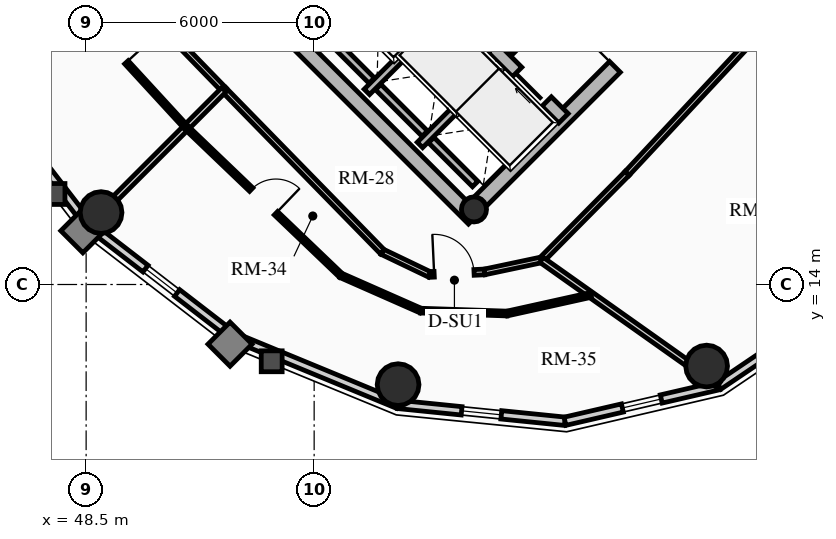
"""IFC4 building model, lengths in metres.
Left out: names, types, materials, properties, quantities, classifications, styles, units other than length and angle.
Written with IfcOpenShell. Run it as: python <this file> out.ifc"""

import sys

from ifc_helpers import new_model, si_unit, direction, frame, frame_2d, origin, origin_2d, place, context, subcontext, project, spatial, rectangle, circle, hollow_circle, extrude, source, transform, mapped, element, fill, save


model = new_model("IFC4")
c1 = context("Model", 3, precision=1e-05, world=origin(), true_north=direction((0.0, 1.0)))
c2 = subcontext(c1, "Body", "Model", "MODEL_VIEW")
j1 = project(units=[si_unit("LENGTHUNIT", "METRE"), si_unit("PLANEANGLEUNIT", "RADIAN")], contexts=[c1])
p1 = place(None, origin())
s1 = spatial("IfcSite", under=j1, at=p1, CompositionType="ELEMENT")
p2 = place(p1, origin())
s2 = spatial("IfcBuilding", under=s1, at=p2, CompositionType="ELEMENT")
p3 = place(p2, frame((0.0, 0.0, 226.05)))
s3 = spatial("IfcBuildingStorey", under=s2, at=p3, CompositionType="ELEMENT", Elevation=226.05)
p4 = place(p3, frame((58.702, 15.732, 0.0), z_axis=(0.0, 0.0, 1.0), x_axis=(-0.707106781187, 0.707106781187, 0.0)))
e1 = element("IfcWall", 1, at=p4, inside=s3, PredefinedType="SHEAR", context=c2, shape_type="SweptSolid", body=[
    extrude(rectangle(XDim=14.1, YDim=0.4, at=frame_2d((7.05, 0.0))), origin(), (0.0, 0.0, 1.0), 3.2),
])
p5 = place(p3, frame((58.561, 15.873, 0.0), z_axis=(0.0, 0.0, 1.0), x_axis=(0.707106781187, 0.707106781187, 0.0)))
e2 = element("IfcWall", 2, at=p5, inside=s3, PredefinedType="SHEAR", context=c2, shape_type="SweptSolid", body=[
    extrude(rectangle(XDim=10.7, YDim=0.4, at=frame_2d((5.35, 0.0))), origin(), (0.0, 0.0, 1.0), 3.2),
])
m1 = source(origin(), c2, "Body", "SweptSolid", [
    extrude(rectangle(XDim=1.5, YDim=2.02, at=frame_2d((0.75, 1.01))), frame((0.0, 0.21, 0.0), z_axis=(0.0, -1.0, 0.0), x_axis=(1.0, 0.0, 0.0)), (0.0, 0.0, 1.0), 0.42),
])
p6 = place(p5, frame((5.45, 0.0, 0.0)))
e3 = element("IfcOpeningElement", 3, at=p6, cuts=e2, PredefinedType="OPENING", context=c2, shape_type="MappedRepresentation", body=[
    mapped(m1, transform((0.0, 0.0, 0.0), x_axis=(1.0, 0.0, 0.0), y_axis=(0.0, 1.0, 0.0), z_axis=(0.0, 0.0, 1.0), scale=1.0)),
])
p7 = place(p3, frame((61.06, 18.373, 0.0), z_axis=(0.0, 0.0, 1.0), x_axis=(-0.707106781187, 0.707106781187, 0.0)))
e4 = element("IfcWall", 4, at=p7, inside=s3, PredefinedType="SHEAR", context=c2, shape_type="SweptSolid", body=[
    extrude(rectangle(XDim=13.7, YDim=0.35, at=frame_2d((6.85, 0.0))), origin(), (0.0, 0.0, 1.0), 3.2),
])
m2 = source(origin(), c2, "Body", "SweptSolid", [
    extrude(rectangle(XDim=1.1, YDim=2.015, at=frame_2d((0.55, 1.007))), frame((0.0, 0.185, 0.0), z_axis=(0.0, -1.0, 0.0), x_axis=(1.0, 0.0, 0.0)), (0.0, 0.0, 1.0), 0.37),
])
p8 = place(p7, frame((4.85, 0.0, 0.0)))
e5 = element("IfcOpeningElement", 5, at=p8, cuts=e4, PredefinedType="OPENING", context=c2, shape_type="MappedRepresentation", body=[
    mapped(m2, transform((0.0, 0.0, 0.0), x_axis=(1.0, 0.0, 0.0), y_axis=(0.0, 1.0, 0.0), z_axis=(0.0, 0.0, 1.0), scale=1.0)),
])
p9 = place(p7, frame((0.625, 0.0, 0.0)))
e6 = element("IfcOpeningElement", 6, at=p9, cuts=e4, PredefinedType="OPENING", context=c2, shape_type="MappedRepresentation", body=[
    mapped(m2, transform((0.0, 0.0, 0.0), x_axis=(1.0, 0.0, 0.0), y_axis=(0.0, 1.0, 0.0), z_axis=(0.0, 0.0, 1.0), scale=1.0)),
])
p10 = place(p7, frame((2.625, 0.0, 0.0)))
e7 = element("IfcOpeningElement", 7, at=p10, cuts=e4, PredefinedType="OPENING", context=c2, shape_type="MappedRepresentation", body=[
    mapped(m2, transform((0.0, 0.0, 0.0), x_axis=(1.0, 0.0, 0.0), y_axis=(0.0, 1.0, 0.0), z_axis=(0.0, 0.0, 1.0), scale=1.0)),
])
m3 = source(origin(), c2, "Body", "SweptSolid", [
    extrude(rectangle(XDim=1.15, YDim=2.02, at=frame_2d((0.575, 1.01))), frame((0.0, 0.185, 0.0), z_axis=(0.0, -1.0, 0.0), x_axis=(1.0, 0.0, 0.0)), (0.0, 0.0, 1.0), 0.37),
])
p11 = place(p7, frame((7.27, 0.0, 0.0)))
e8 = element("IfcOpeningElement", 8, at=p11, cuts=e4, PredefinedType="OPENING", context=c2, shape_type="MappedRepresentation", body=[
    mapped(m3, transform((0.0, 0.0, 0.0), x_axis=(1.0, 0.0, 0.0), y_axis=(0.0, 1.0, 0.0), z_axis=(0.0, 0.0, 1.0), scale=1.0)),
])
p12 = place(p3, frame((58.706, 15.976, 0.0), z_axis=(0.0, 0.0, 1.0), x_axis=(0.707106781187, 0.707106781187, 0.0)))
e9 = element("IfcColumn", 9, at=p12, inside=s3, PredefinedType="COLUMN", context=c2, shape_type="SweptSolid", body=[
    extrude(hollow_circle(Radius=0.33, WallThickness=0.025, at=origin_2d()), origin(), (0.0, 0.0, 1.0), 3.2),
])
for number, where, z_axis, x_axis in (
    (10, (48.893, 15.893, 0.0), (0.0, 0.0, 1.0), (1.0, 0.0, 0.0)),
    (11, (56.709, 11.365, 0.0), (0.0, 0.0, 1.0), (1.0, 0.0, 0.0)),
    (12, (64.827, 11.854, 0.0), (0.0, 0.0, 1.0), (1.0, 0.0, 0.0)),
):
    element("IfcColumn", number, at=place(p3, frame(where, z_axis=z_axis, x_axis=x_axis)), inside=s3, PredefinedType="USERDEFINED", context=c2, shape_type="SweptSolid", body=[
        extrude(circle(Radius=0.55, at=origin_2d()), origin(), (0.0, 0.0, 1.0), 3.2),
    ])
p13 = place(p3, frame((48.569, 15.569, 0.0), z_axis=(0.0, 0.0, 1.0), x_axis=(-0.610523083886, 0.791998462147, 0.0)))
e13 = element("IfcWall", 13, at=p13, inside=s3, PredefinedType="SOLIDWALL", context=c2, shape_type="SweptSolid", body=[
    extrude(rectangle(XDim=4.82, YDim=0.22, at=frame_2d((2.41, 0.0))), origin(), (0.0, 0.0, 1.0), 2.612),
])
p14 = place(p3, frame((52.387, 12.626, 0.0), z_axis=(0.0, 0.0, 1.0), x_axis=(-0.791998462147, 0.610523083886, 0.0)))
e14 = element("IfcWall", 14, at=p14, inside=s3, PredefinedType="SOLIDWALL", context=c2, shape_type="SweptSolid", body=[
    extrude(rectangle(XDim=4.82, YDim=0.22, at=frame_2d((2.41, 0.0))), origin(), (0.0, 0.0, 1.0), 2.612),
])
m4 = source(origin(), c2, "Body", "SweptSolid", [
    extrude(rectangle(XDim=1.05, YDim=1.3, at=frame_2d((0.525, 0.65))), frame((0.0, 0.12, 0.0), z_axis=(0.0, -1.0, 0.0), x_axis=(1.0, 0.0, 0.0)), (0.0, 0.0, 1.0), 0.24),
])
p15 = place(p14, frame((1.885, 0.0, 0.65)))
e15 = element("IfcOpeningElement", 15, at=p15, cuts=e14, PredefinedType="OPENING", context=c2, shape_type="MappedRepresentation", body=[
    mapped(m4, transform((0.0, 0.0, 0.0), x_axis=(1.0, 0.0, 0.0), y_axis=(0.0, 1.0, 0.0), z_axis=(0.0, 0.0, 1.0), scale=1.0)),
])
p16 = place(p3, frame((56.705, 10.845, 0.0), z_axis=(0.0, 0.0, 1.0), x_axis=(-0.924447353237, 0.381309704956, 0.0)))
e16 = element("IfcWall", 16, at=p16, inside=s3, PredefinedType="SOLIDWALL", context=c2, shape_type="SweptSolid", body=[
    extrude(rectangle(XDim=4.671, YDim=0.22, at=frame_2d((2.335, 0.0))), origin(), (0.0, 0.0, 1.0), 2.612),
])
p17 = place(p3, frame((61.1, 10.401, 0.0), z_axis=(0.0, 0.0, 1.0), x_axis=(-0.994929930991, 0.100570534541, 0.0)))
e17 = element("IfcWall", 17, at=p17, inside=s3, PredefinedType="SOLIDWALL", context=c2, shape_type="SweptSolid", body=[
    extrude(rectangle(XDim=4.418, YDim=0.22, at=frame_2d((2.209, 0.0))), origin(), (0.0, 0.0, 1.0), 2.612),
])
p18 = place(p17, frame((1.684, 0.0, 0.65)))
e18 = element("IfcOpeningElement", 18, at=p18, cuts=e17, PredefinedType="OPENING", context=c2, shape_type="MappedRepresentation", body=[
    mapped(m4, transform((0.0, 0.0, 0.0), x_axis=(1.0, 0.0, 0.0), y_axis=(0.0, 1.0, 0.0), z_axis=(0.0, 0.0, 1.0), scale=1.0)),
])
p19 = place(p3, frame((65.144, 11.337, 0.0), z_axis=(0.0, 0.0, 1.0), x_axis=(-0.974249228678, -0.225473813158, 0.0)))
e19 = element("IfcWall", 19, at=p19, inside=s3, PredefinedType="SOLIDWALL", context=c2, shape_type="SweptSolid", body=[
    extrude(rectangle(XDim=4.15, YDim=0.22, at=frame_2d((2.075, 0.0))), origin(), (0.0, 0.0, 1.0), 2.612),
])
p20 = place(p19, frame((1.55, 0.0, 0.65)))
e20 = element("IfcOpeningElement", 20, at=p20, cuts=e19, PredefinedType="OPENING", context=c2, shape_type="MappedRepresentation", body=[
    mapped(m4, transform((0.0, 0.0, 0.0), x_axis=(1.0, 0.0, 0.0), y_axis=(0.0, 1.0, 0.0), z_axis=(0.0, 0.0, 1.0), scale=1.0)),
])
p21 = place(p3, frame((68.439, 13.561, 0.0), z_axis=(0.0, 0.0, 1.0), x_axis=(-0.828833723692, -0.559495003079, 0.0)))
e21 = element("IfcWall", 21, at=p21, inside=s3, PredefinedType="SOLIDWALL", context=c2, shape_type="SweptSolid", body=[
    extrude(rectangle(XDim=3.976, YDim=0.22, at=frame_2d((1.988, 0.0))), origin(), (0.0, 0.0, 1.0), 2.612),
])
p22 = place(p3, frame((55.888, 19.069, 0.0), z_axis=(0.0, 0.0, 1.0), x_axis=(0.707106781187, 0.707106781187, 0.0)))
e22 = element("IfcWall", 22, at=p22, inside=s3, PredefinedType="SHEAR", context=c2, shape_type="SweptSolid", body=[
    extrude(rectangle(XDim=2.97, YDim=0.2, at=frame_2d((1.485, 0.0))), origin(), (0.0, 0.0, 1.0), 3.2),
])
p23 = place(p3, frame((56.015, 19.366, 0.0), z_axis=(0.0, 0.0, 1.0), x_axis=(-0.707106781187, 0.707106781187, 0.0)))
e23 = element("IfcWall", 23, at=p23, inside=s3, PredefinedType="SHEAR", context=c2, shape_type="SweptSolid", body=[
    extrude(rectangle(XDim=2.44, YDim=0.2, at=frame_2d((1.22, 0.0))), origin(), (0.0, 0.0, 1.0), 3.2),
])
p24 = place(p3, frame((57.284, 17.673, 0.0), z_axis=(0.0, 0.0, 1.0), x_axis=(0.707147878904, 0.70706568108, 0.0)))
e24 = element("IfcWall", 24, at=p24, inside=s3, PredefinedType="SHEAR", context=c2, shape_type="SweptSolid", body=[
    extrude(rectangle(XDim=2.97, YDim=0.2, at=frame_2d((1.485, 0.0))), origin(), (0.0, 0.0, 1.0), 3.2),
])
p25 = place(p3, frame((57.412, 17.97, 0.0), z_axis=(0.0, 0.0, 1.0), x_axis=(-0.707106781187, 0.707106781187, 0.0)))
e25 = element("IfcWall", 25, at=p25, inside=s3, PredefinedType="SHEAR", context=c2, shape_type="SweptSolid", body=[
    extrude(rectangle(XDim=1.735, YDim=0.2, at=frame_2d((0.867, 0.0))), origin(), (0.0, 0.0, 1.0), 3.2),
])
p26 = place(p3, frame((58.737, 16.644, 0.0), z_axis=(0.0, 0.0, 1.0), x_axis=(-0.707032117043, 0.707181437447, 0.0)))
e26 = element("IfcWall", 26, at=p26, inside=s3, PredefinedType="SHEAR", context=c2, shape_type="SweptSolid", body=[
    extrude(rectangle(XDim=1.635, YDim=0.2, at=frame_2d((0.817, 0.0))), origin(), (0.0, 0.0, 1.0), 3.2),
])
p27 = place(p3, frame((59.643, 20.066, 0.0), z_axis=(0.0, 0.0, 1.0), x_axis=(0.707106781187, 0.707106781187, 0.0)))
e27 = element("IfcWall", 27, at=p27, inside=s3, PredefinedType="PARTITIONING", context=c2, shape_type="SweptSolid", body=[
    extrude(rectangle(XDim=1.1, YDim=0.125, at=frame_2d((0.55, 0.0))), origin(), (0.0, 0.0, 1.0), 2.975),
])
p28 = place(p3, frame((48.052, 23.323, 0.0), z_axis=(0.0, 0.0, 1.0), x_axis=(0.696573981306, -0.717484974454, 0.0)))
e28 = element("IfcWall", 28, at=p28, inside=s3, PredefinedType="PARTITIONING", context=c2, shape_type="SweptSolid", body=[
    extrude(rectangle(XDim=5.849, YDim=0.15, at=frame_2d((2.925, 0.0))), origin(), (0.0, 0.0, 1.0), 2.975),
])
p29 = place(p3, frame((52.126, 19.126, 0.0), z_axis=(0.0, 0.0, 1.0), x_axis=(0.698979087027, -0.715142108884, 0.0)))
e29 = element("IfcWall", 29, at=p29, inside=s3, PredefinedType="PARTITIONING", context=c2, shape_type="SweptSolid", body=[
    extrude(rectangle(XDim=5.966, YDim=0.15, at=frame_2d((2.983, 0.0))), origin(), (0.0, 0.0, 1.0), 2.612),
])
p30 = place(p3, frame((56.296, 14.859, 0.0), z_axis=(0.0, 0.0, 1.0), x_axis=(0.90178292445, -0.432189260823, 0.0)))
e30 = element("IfcWall", 30, at=p30, inside=s3, PredefinedType="PARTITIONING", context=c2, shape_type="SweptSolid", body=[
    extrude(rectangle(XDim=1.377, YDim=0.15, at=frame_2d((0.688, 0.0))), origin(), (0.0, 0.0, 1.0), 2.545),
])
p31 = place(p3, frame((57.538, 14.264, 0.0), z_axis=(0.0, 0.0, 1.0), x_axis=(0.99892990172, 0.046249880546, 0.0)))
e31 = element("IfcWall", 31, at=p31, inside=s3, PredefinedType="PARTITIONING", context=c2, shape_type="SweptSolid", body=[
    extrude(rectangle(XDim=1.446, YDim=0.15, at=frame_2d((0.723, 0.0))), origin(), (0.0, 0.0, 1.0), 2.612),
])
m5 = source(origin(), c2, "Body", "SweptSolid", [
    extrude(rectangle(XDim=1.05, YDim=2.015, at=frame_2d((0.525, 1.007))), frame((0.0, 0.085, 0.0), z_axis=(0.0, -1.0, 0.0), x_axis=(1.0, 0.0, 0.0)), (0.0, 0.0, 1.0), 0.17),
])
p32 = place(p31, frame((0.12, 0.0, 0.0)))
e32 = element("IfcOpeningElement", 32, at=p32, cuts=e31, PredefinedType="OPENING", context=c2, shape_type="MappedRepresentation", body=[
    mapped(m5, transform((0.0, 0.0, 0.0), x_axis=(1.0, 0.0, 0.0), y_axis=(0.0, 1.0, 0.0), z_axis=(0.0, 0.0, 1.0), scale=1.0)),
])
p33 = place(p3, frame((58.983, 14.331, 0.0), z_axis=(0.0, 0.0, 1.0), x_axis=(0.978328007546, 0.207061125397, 0.0)))
e33 = element("IfcWall", 33, at=p33, inside=s3, PredefinedType="PARTITIONING", context=c2, shape_type="SweptSolid", body=[
    extrude(rectangle(XDim=1.534, YDim=0.15, at=frame_2d((0.767, 0.0))), origin(), (0.0, 0.0, 1.0), 2.545),
])
p34 = place(p3, frame((60.484, 14.648, 0.0), z_axis=(0.0, 0.0, 1.0), x_axis=(0.703398221944, 0.710795991383, 0.0)))
e34 = element("IfcWall", 34, at=p34, inside=s3, PredefinedType="PARTITIONING", context=c2, shape_type="SweptSolid", body=[
    extrude(rectangle(XDim=3.201, YDim=0.15, at=frame_2d((1.601, 0.0))), origin(), (0.0, 0.0, 1.0), 2.612),
])
p35 = place(p3, frame((62.736, 16.924, 0.0), z_axis=(0.0, 0.0, 1.0), x_axis=(0.681946700833, 0.731401871219, 0.0)))
e35 = element("IfcWall", 35, at=p35, inside=s3, PredefinedType="PARTITIONING", context=c2, shape_type="SweptSolid", body=[
    extrude(rectangle(XDim=6.393, YDim=0.15, at=frame_2d((3.196, 0.0))), origin(), (0.0, 0.0, 1.0), 2.545),
])
p36 = place(p3, frame((52.126, 19.126, 0.0), z_axis=(0.0, 0.0, 1.0), x_axis=(-0.707106781187, -0.707106781187, 0.0)))
e36 = element("IfcWall", 36, at=p36, inside=s3, PredefinedType="PARTITIONING", context=c2, shape_type="SweptSolid", body=[
    extrude(rectangle(XDim=5.01, YDim=0.16, at=frame_2d((2.505, 0.0))), origin(), (0.0, 0.0, 1.0), 2.612),
])
p37 = place(p3, frame((60.484, 14.648, 0.0), z_axis=(0.0, 0.0, 1.0), x_axis=(0.81605983932, -0.577967420058, 0.0)))
e37 = element("IfcWall", 37, at=p37, inside=s3, PredefinedType="PARTITIONING", context=c2, shape_type="SweptSolid", body=[
    extrude(rectangle(XDim=5.699, YDim=0.16, at=frame_2d((2.85, 0.0))), origin(), (0.0, 0.0, 1.0), 2.612),
])
p38 = place(p3, frame((47.377, 22.223, 0.0), z_axis=(0.0, 0.0, 1.0), x_axis=(0.676554417653, -0.736392639802, 0.0)))
e38 = element("IfcWall", 38, at=p38, inside=s3, PredefinedType="PARTITIONING", context=c2, shape_type="SweptSolid", body=[
    extrude(rectangle(XDim=5.553, YDim=0.125, at=frame_2d((2.776, 0.0))), origin(), (0.0, 0.0, 1.0), 2.975),
])
m6 = source(origin(), c2, "Body", "SweptSolid", [
    extrude(rectangle(XDim=0.9, YDim=2.005, at=frame_2d((0.45, 1.002))), frame((0.0, 0.073, 0.0), z_axis=(0.0, -1.0, 0.0), x_axis=(1.0, 0.0, 0.0)), (0.0, 0.0, 1.0), 0.145),
])
p39 = place(p38, frame((2.326, 0.0, 0.0)))
e39 = element("IfcOpeningElement", 39, at=p39, cuts=e38, PredefinedType="OPENING", context=c2, shape_type="MappedRepresentation", body=[
    mapped(m6, transform((0.0, 0.0, 0.0), x_axis=(1.0, 0.0, 0.0), y_axis=(0.0, 1.0, 0.0), z_axis=(0.0, 0.0, 1.0), scale=1.0)),
])
p40 = place(p3, frame((51.134, 18.134, 0.0), z_axis=(0.0, 0.0, 1.0), x_axis=(0.722450775654, -0.691422357721, 0.0)))
e40 = element("IfcWall", 40, at=p40, inside=s3, PredefinedType="PARTITIONING", context=c2, shape_type="SweptSolid", body=[
    extrude(rectangle(XDim=5.634, YDim=0.125, at=frame_2d((2.817, 0.0))), origin(), (0.0, 0.0, 1.0), 2.612),
])
p41 = place(p40, frame((2.367, 0.0, 0.0)))
e41 = element("IfcOpeningElement", 41, at=p41, cuts=e40, PredefinedType="OPENING", context=c2, shape_type="MappedRepresentation", body=[
    mapped(m6, transform((0.0, 0.0, 0.0), x_axis=(1.0, 0.0, 0.0), y_axis=(0.0, 1.0, 0.0), z_axis=(0.0, 0.0, 1.0), scale=1.0)),
])
p42 = place(p3, frame((55.204, 14.239, 0.0), z_axis=(0.0, 0.0, 1.0), x_axis=(0.914999746908, -0.403454412738, 0.0)))
e42 = element("IfcWall", 42, at=p42, inside=s3, PredefinedType="PARTITIONING", context=c2, shape_type="SweptSolid", body=[
    extrude(rectangle(XDim=2.297, YDim=0.125, at=frame_2d((1.148, 0.0))), origin(), (0.0, 0.0, 1.0), 2.545),
])
p43 = place(p3, frame((57.306, 13.312, 0.0), z_axis=(0.0, 0.0, 1.0), x_axis=(0.999437122872, -0.033547539789, 0.0)))
e43 = element("IfcWall", 43, at=p43, inside=s3, PredefinedType="PARTITIONING", context=c2, shape_type="SweptSolid", body=[
    extrude(rectangle(XDim=2.271, YDim=0.125, at=frame_2d((1.135, 0.0))), origin(), (0.0, 0.0, 1.0), 2.612),
])
p44 = place(p3, frame((59.575, 13.236, 0.0), z_axis=(0.0, 0.0, 1.0), x_axis=(0.97628336492, 0.216496631337, 0.0)))
e44 = element("IfcWall", 44, at=p44, inside=s3, PredefinedType="PARTITIONING", context=c2, shape_type="SweptSolid", body=[
    extrude(rectangle(XDim=2.264, YDim=0.125, at=frame_2d((1.132, 0.0))), origin(), (0.0, 0.0, 1.0), 2.545),
])
m7 = source(origin(), c2, "Body", "SweptSolid", [
    extrude(rectangle(XDim=1.05, YDim=1.3, at=frame_2d((0.525, 0.65))), frame((0.0, 0.03, 0.0), z_axis=(0.0, -1.0, 0.0), x_axis=(1.0, 0.0, 0.0)), (0.0, 0.0, 1.0), 0.06),
])
p45 = place(p15, origin())
e45 = element("IfcWindow", 45, at=p45, inside=s3, PartitioningType="SINGLE_PANEL", PredefinedType="WINDOW", context=c2, shape_type="MappedRepresentation", body=[
    mapped(m7, transform((0.0, 0.0, 0.0), x_axis=(1.0, 0.0, 0.0), y_axis=(0.0, 1.0, 0.0), z_axis=(0.0, 0.0, 1.0), scale=1.0)),
])
fill(e15, e45)
p46 = place(p18, origin())
e46 = element("IfcWindow", 46, at=p46, inside=s3, PartitioningType="SINGLE_PANEL", PredefinedType="WINDOW", context=c2, shape_type="MappedRepresentation", body=[
    mapped(m7, transform((0.0, 0.0, 0.0), x_axis=(1.0, 0.0, 0.0), y_axis=(0.0, 1.0, 0.0), z_axis=(0.0, 0.0, 1.0), scale=1.0)),
])
fill(e18, e46)
p47 = place(p20, origin())
e47 = element("IfcWindow", 47, at=p47, inside=s3, PartitioningType="SINGLE_PANEL", PredefinedType="WINDOW", context=c2, shape_type="MappedRepresentation", body=[
    mapped(m7, transform((0.0, 0.0, 0.0), x_axis=(1.0, 0.0, 0.0), y_axis=(0.0, 1.0, 0.0), z_axis=(0.0, 0.0, 1.0), scale=1.0)),
])
fill(e20, e47)
m8 = source(origin(), c2, "Body", "SweptSolid", [
    extrude(rectangle(XDim=1.1, YDim=2.015, at=frame_2d((0.55, 1.007))), frame((0.0, 0.025, 0.0), z_axis=(0.0, -1.0, 0.0), x_axis=(1.0, 0.0, 0.0)), (0.0, 0.0, 1.0), 0.05),
])
p48 = place(p9, origin())
e48 = element("IfcDoor", 48, at=p48, inside=s3, OperationType="SLIDING_TO_RIGHT", PredefinedType="DOOR", context=c2, shape_type="MappedRepresentation", body=[
    mapped(m8, transform((0.0, 0.0, 0.0), x_axis=(1.0, 0.0, 0.0), y_axis=(0.0, 1.0, 0.0), z_axis=(0.0, 0.0, 1.0), scale=1.0)),
])
fill(e6, e48)
m9 = source(origin(), c2, "Body", "SweptSolid", [
    extrude(rectangle(XDim=1.5, YDim=2.02, at=frame_2d((0.75, 1.01))), frame((0.0, 0.025, 0.0), z_axis=(0.0, -1.0, 0.0), x_axis=(1.0, 0.0, 0.0)), (0.0, 0.0, 1.0), 0.05),
])
p49 = place(p6, origin())
e49 = element("IfcDoor", 49, at=p49, inside=s3, OperationType="DOUBLE_DOOR_SINGLE_SWING", PredefinedType="DOOR", context=c2, shape_type="MappedRepresentation", body=[
    mapped(m9, transform((0.0, 0.0, 0.0), x_axis=(1.0, 0.0, 0.0), y_axis=(0.0, 1.0, 0.0), z_axis=(0.0, 0.0, 1.0), scale=1.0)),
])
fill(e3, e49)
m10 = source(origin(), c2, "Body", "SweptSolid", [
    extrude(rectangle(XDim=0.9, YDim=2.005, at=frame_2d((0.45, 1.002))), frame((0.0, 0.025, 0.0), z_axis=(0.0, -1.0, 0.0), x_axis=(1.0, 0.0, 0.0)), (0.0, 0.0, 1.0), 0.05),
])
p50 = place(p39, origin())
e50 = element("IfcDoor", 50, at=p50, inside=s3, OperationType="SINGLE_SWING_RIGHT", PredefinedType="DOOR", context=c2, shape_type="MappedRepresentation", body=[
    mapped(m10, transform((0.0, 0.0, 0.0), x_axis=(1.0, 0.0, 0.0), y_axis=(0.0, 1.0, 0.0), z_axis=(0.0, 0.0, 1.0), scale=1.0)),
])
fill(e39, e50)
m11 = source(origin(), c2, "Body", "SweptSolid", [
    extrude(rectangle(XDim=1.05, YDim=2.015, at=frame_2d((0.525, 1.007))), frame((0.0, 0.025, 0.0), z_axis=(0.0, -1.0, 0.0), x_axis=(1.0, 0.0, 0.0)), (0.0, 0.0, 1.0), 0.05),
])
p51 = place(p32, origin())
e51 = element("IfcDoor", 51, at=p51, inside=s3, OperationType="SINGLE_SWING_LEFT", PredefinedType="DOOR", context=c2, shape_type="MappedRepresentation", body=[
    mapped(m11, transform((0.0, 0.0, 0.0), x_axis=(1.0, 0.0, 0.0), y_axis=(0.0, 1.0, 0.0), z_axis=(0.0, 0.0, 1.0), scale=1.0)),
])
fill(e32, e51)
p52 = place(p41, origin())
e52 = element("IfcDoor", 52, at=p52, inside=s3, OperationType="SINGLE_SWING_RIGHT", PredefinedType="DOOR", context=c2, shape_type="MappedRepresentation", body=[
    mapped(m10, transform((0.0, 0.0, 0.0), x_axis=(1.0, 0.0, 0.0), y_axis=(0.0, 1.0, 0.0), z_axis=(0.0, 0.0, 1.0), scale=1.0)),
])
fill(e41, e52)
save(model, sys.argv[1])
